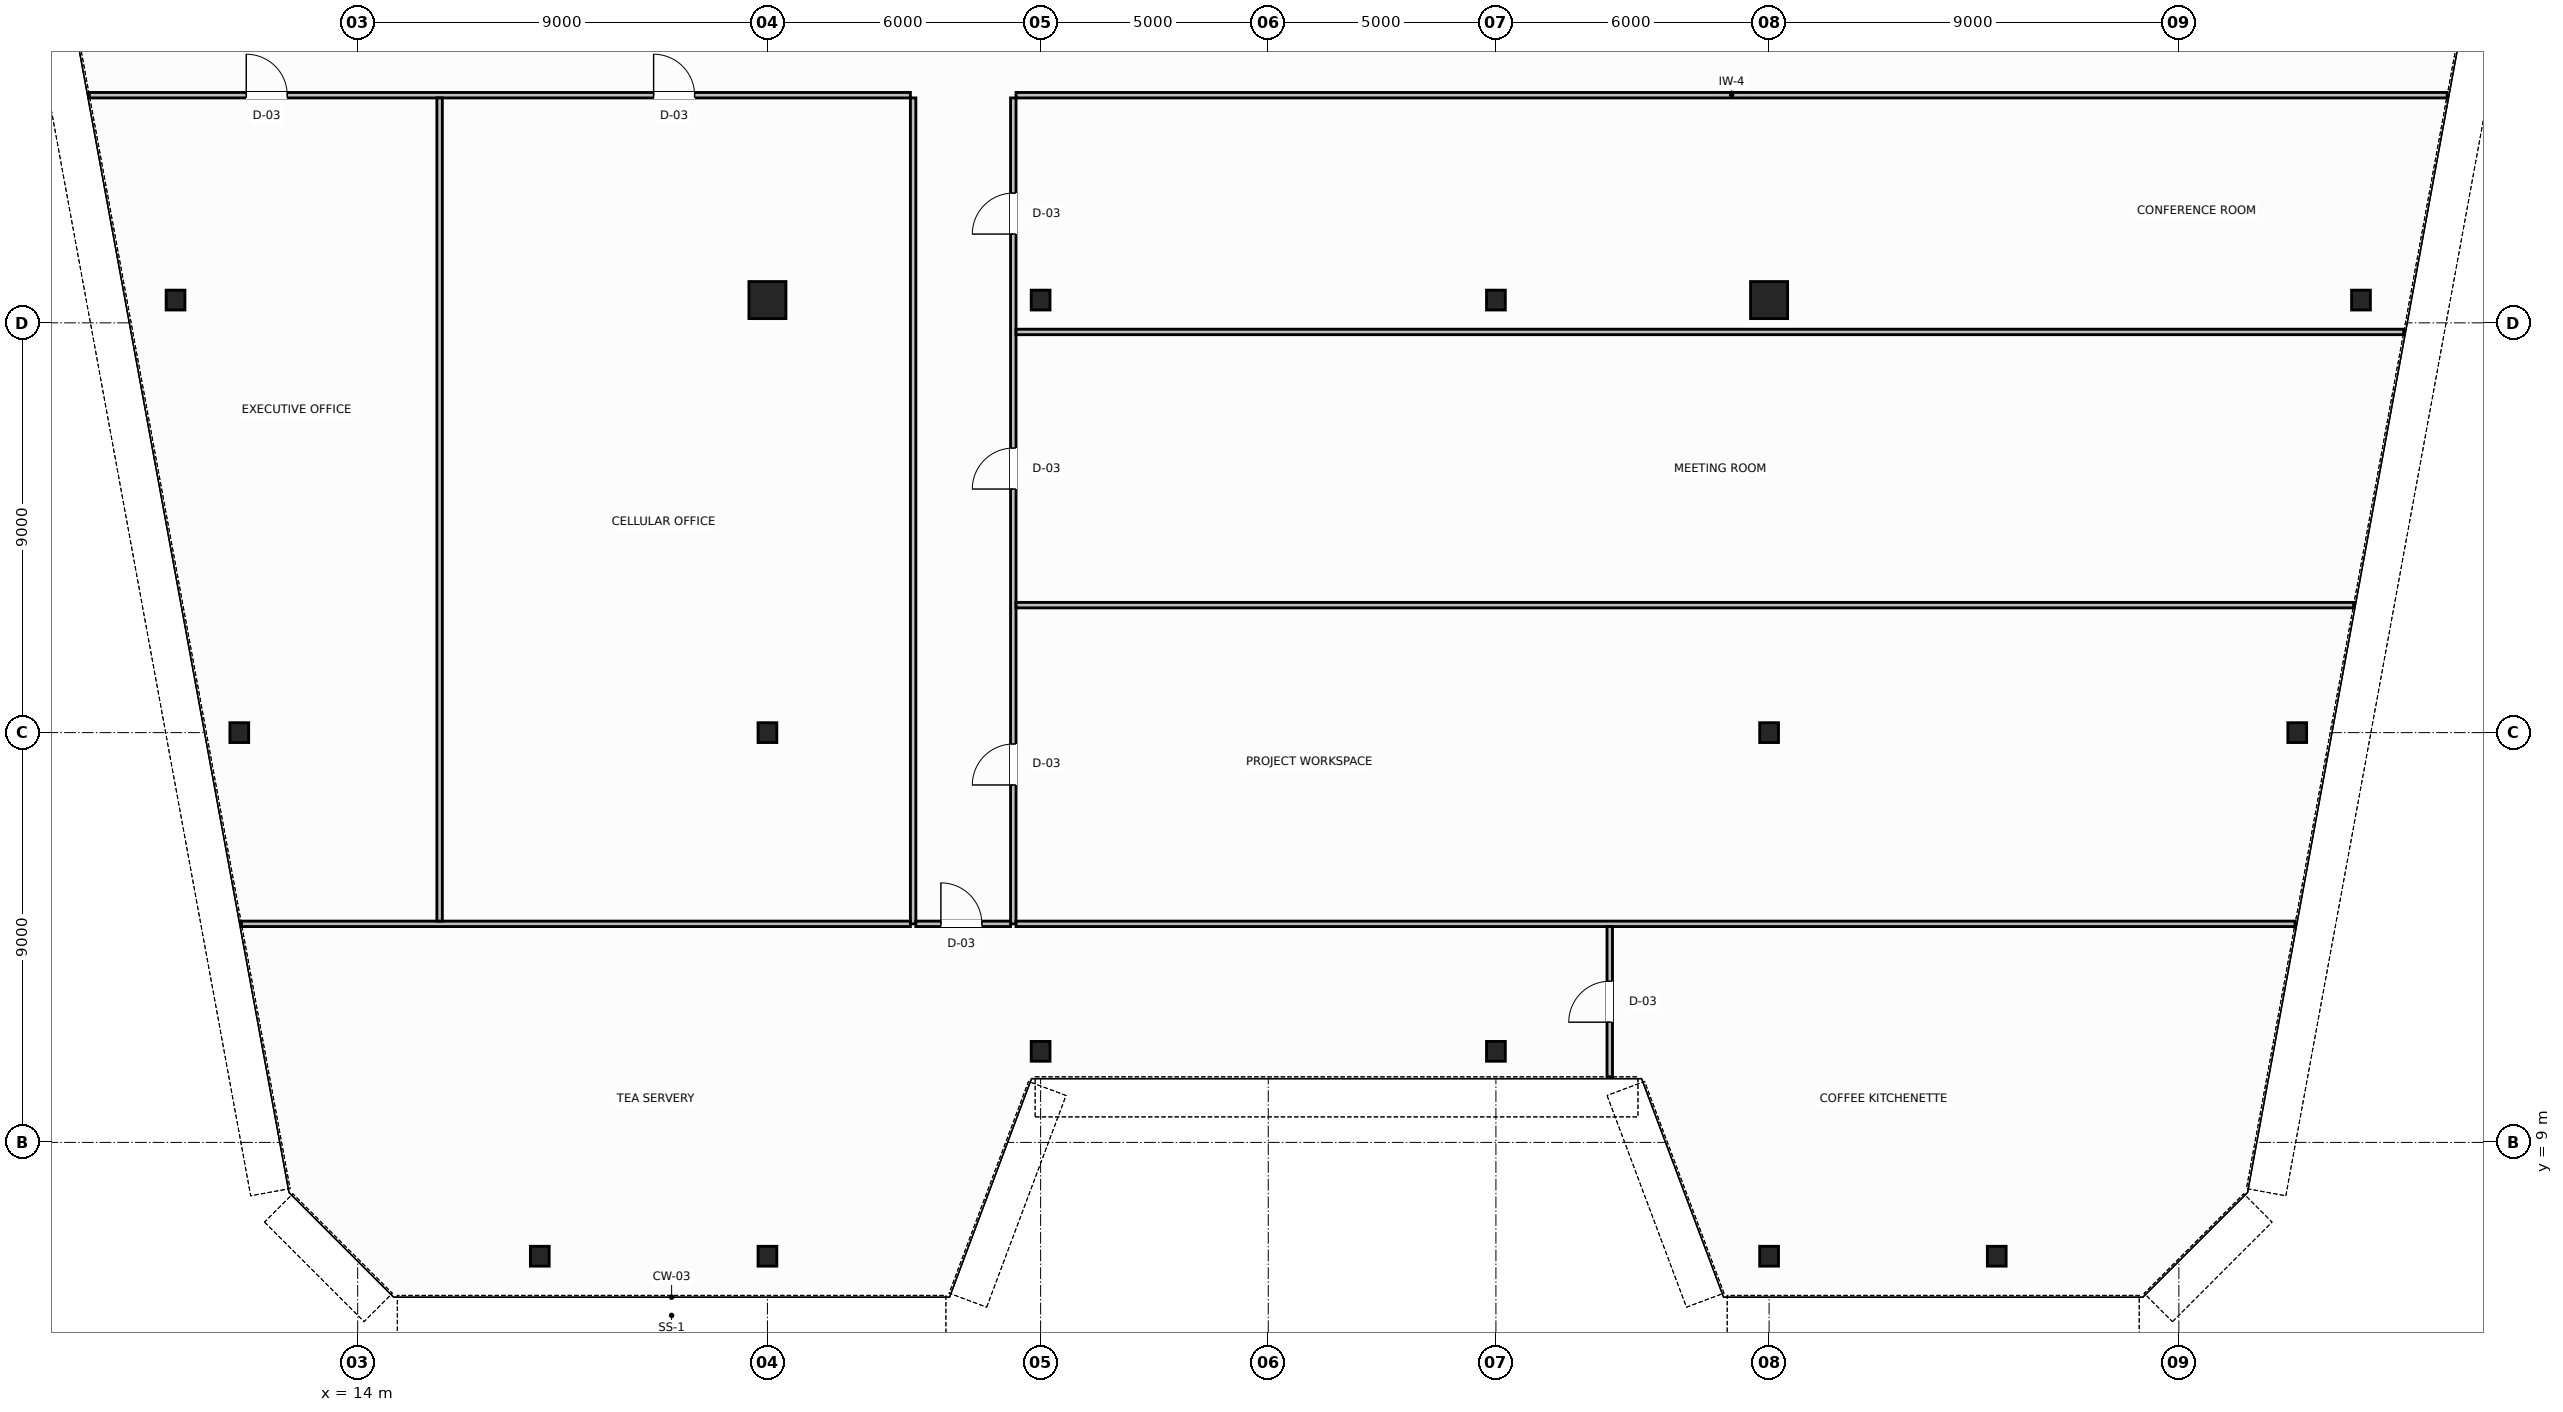
"""IFC4 building model, lengths in metres.
Left out: names, types, materials, properties, quantities, classifications, styles, units other than length and angle.
Written with IfcOpenShell. Run it as: python <this file> out.ifc"""

import sys

from ifc_helpers import new_model, si_unit, direction, frame, frame_2d, origin, origin_2d, place, context, subcontext, project, spatial, rectangle, hollow_circle, i_section, extrude, source, transform, mapped, element, fill, save


model = new_model("IFC4")
c1 = context("Model", 3, precision=1e-05, world=origin(), true_north=direction((0.0, 1.0)))
c2 = subcontext(c1, "Body", "Model", "MODEL_VIEW")
j1 = project(units=[si_unit("LENGTHUNIT", "METRE"), si_unit("PLANEANGLEUNIT", "RADIAN")], contexts=[c1])
p1 = place(None, origin())
s1 = spatial("IfcSite", under=j1, at=p1, CompositionType="ELEMENT")
p2 = place(p1, origin())
s2 = spatial("IfcBuilding", under=s1, at=p2, CompositionType="ELEMENT")
p3 = place(p2, frame((0.0, 0.0, 195.6)))
s3 = spatial("IfcBuildingStorey", under=s2, at=p3, CompositionType="ELEMENT", Elevation=195.6)
m1 = source(origin(), c2, "Body", "SweptSolid", [
    extrude(i_section(OverallWidth=0.412, OverallDepth=0.435, WebThickness=0.036, FlangeThickness=0.05, FilletRadius=0.015, at=origin_2d()), origin(), (0.0, 0.0, 1.0), 3.8),
])
for number, where, z_axis, x_axis in (
    (1, (10.0, 27.5, 0.0), (0.0, 0.0, 1.0), (1.0, 0.0, 0.0)),
    (2, (11.4, 18.0, 0.0), (0.0, 0.0, 1.0), (1.0, 0.0, 0.0)),
    (3, (58.0, 27.5, 0.0), (0.0, 0.0, 1.0), (1.0, 0.0, 0.0)),
    (4, (56.6, 18.0, 0.0), (0.0, 0.0, 1.0), (1.0, 0.0, 0.0)),
):
    element("IfcColumn", number, at=place(p3, frame(where, z_axis=z_axis, x_axis=x_axis)), inside=s3, PredefinedType="COLUMN", context=c2, shape_type="MappedRepresentation", body=[
        mapped(m1, transform((0.0, 0.0, 0.0), scale=1.0)),
    ])
m2 = source(origin(), c2, "Body", "SweptSolid", [
    extrude(hollow_circle(Radius=0.406, WallThickness=0.04, at=origin_2d()), origin(), (0.0, 0.0, 1.0), 3.8),
])
p4 = place(p3, frame((23.0, 27.5, 0.0), z_axis=(0.0, 0.0, 1.0), x_axis=(1.0, 0.0, 0.0)))
e5 = element("IfcColumn", 5, at=p4, inside=s3, PredefinedType="COLUMN", context=c2, shape_type="MappedRepresentation", body=[
    mapped(m2, transform((0.0, 0.0, 0.0), scale=1.0)),
])
m3 = source(origin(), c2, "Body", "SweptSolid", [
    extrude(i_section(OverallWidth=0.412, OverallDepth=0.435, WebThickness=0.036, FlangeThickness=0.05, FilletRadius=0.015, at=origin_2d()), origin(), (0.0, 0.0, 1.0), 3.8),
])
for number, where, z_axis, x_axis in (
    (6, (29.0, 27.5, 0.0), (0.0, 0.0, 1.0), (1.0, 0.0, 0.0)),
    (7, (39.0, 27.5, 0.0), (0.0, 0.0, 1.0), (1.0, 0.0, 0.0)),
):
    element("IfcColumn", number, at=place(p3, frame(where, z_axis=z_axis, x_axis=x_axis)), inside=s3, PredefinedType="COLUMN", context=c2, shape_type="MappedRepresentation", body=[
        mapped(m3, transform((0.0, 0.0, 0.0), scale=1.0)),
    ])
p5 = place(p3, frame((45.0, 27.5, 0.0), z_axis=(0.0, 0.0, 1.0), x_axis=(1.0, 0.0, 0.0)))
e8 = element("IfcColumn", 8, at=p5, inside=s3, PredefinedType="COLUMN", context=c2, shape_type="MappedRepresentation", body=[
    mapped(m2, transform((0.0, 0.0, 0.0), scale=1.0)),
])
for number, where, z_axis, x_axis in (
    (9, (23.0, 18.0, 0.0), (0.0, 0.0, 1.0), (1.0, 0.0, 0.0)),
    (10, (45.0, 18.0, 0.0), (0.0, 0.0, 1.0), (1.0, 0.0, 0.0)),
    (11, (18.0, 6.5, 0.0), (0.0, 0.0, 1.0), (1.0, 0.0, 0.0)),
    (12, (23.0, 6.5, 0.0), (0.0, 0.0, 1.0), (1.0, 0.0, 0.0)),
    (13, (29.0, 11.0, 0.0), (0.0, 0.0, 1.0), (1.0, 0.0, 0.0)),
    (14, (39.0, 11.0, 0.0), (0.0, 0.0, 1.0), (1.0, 0.0, 0.0)),
    (15, (45.0, 6.5, 0.0), (0.0, 0.0, 1.0), (1.0, 0.0, 0.0)),
    (16, (50.0, 6.5, 0.0), (0.0, 0.0, 1.0), (1.0, 0.0, 0.0)),
):
    element("IfcColumn", number, at=place(p3, frame(where, z_axis=z_axis, x_axis=x_axis)), inside=s3, PredefinedType="COLUMN", context=c2, shape_type="MappedRepresentation", body=[
        mapped(m3, transform((0.0, 0.0, 0.0), scale=1.0)),
    ])
p6 = place(p3, frame((8.106, 32.0, 0.0), z_axis=(0.0, 0.0, 1.0), x_axis=(1.0, 0.0, 0.0)))
e17 = element("IfcWall", 17, at=p6, inside=s3, PredefinedType="PARTITIONING", context=c2, shape_type="SweptSolid", body=[
    extrude(rectangle(XDim=18.034, YDim=0.12, at=frame_2d((9.017, 0.0))), origin(), (0.0, 0.0, 1.0), 3.58),
])
p7 = place(p6, frame((3.447, 0.0, 0.0)))
e18 = element("IfcOpeningElement", 18, at=p7, cuts=e17, PredefinedType="OPENING", context=c2, shape_type="SweptSolid", body=[
    extrude(rectangle(XDim=0.9, YDim=2.15, at=frame_2d((0.45, 1.075))), frame((0.0, 0.07, 0.0), z_axis=(0.0, -1.0, 0.0), x_axis=(1.0, 0.0, 0.0)), (0.0, 0.0, 1.0), 0.14),
])
p8 = place(p6, frame((12.394, 0.0, 0.0)))
e19 = element("IfcOpeningElement", 19, at=p8, cuts=e17, PredefinedType="OPENING", context=c2, shape_type="SweptSolid", body=[
    extrude(rectangle(XDim=0.9, YDim=2.15, at=frame_2d((0.45, 1.075))), frame((0.0, 0.07, 0.0), z_axis=(0.0, -1.0, 0.0), x_axis=(1.0, 0.0, 0.0)), (0.0, 0.0, 1.0), 0.14),
])
p9 = place(p3, frame((28.46, 32.0, 0.0), z_axis=(0.0, 0.0, 1.0), x_axis=(1.0, 0.0, 0.0)))
e20 = element("IfcWall", 20, at=p9, inside=s3, PredefinedType="PARTITIONING", context=c2, shape_type="SweptSolid", body=[
    extrude(rectangle(XDim=31.434, YDim=0.12, at=frame_2d((15.717, 0.0))), origin(), (0.0, 0.0, 1.0), 3.58),
])
p10 = place(p3, frame((26.2, 13.8, 0.0), z_axis=(0.0, 0.0, 1.0), x_axis=(0.0, 1.0, 0.0)))
e21 = element("IfcWall", 21, at=p10, inside=s3, PredefinedType="PARTITIONING", context=c2, shape_type="SweptSolid", body=[
    extrude(rectangle(XDim=18.14, YDim=0.12, at=frame_2d((9.07, 0.0))), origin(), (0.0, 0.0, 1.0), 3.58),
])
p11 = place(p3, frame((28.4, 13.8, 0.0), z_axis=(0.0, 0.0, 1.0), x_axis=(0.0, 1.0, 0.0)))
e22 = element("IfcWall", 22, at=p11, inside=s3, PredefinedType="PARTITIONING", context=c2, shape_type="SweptSolid", body=[
    extrude(rectangle(XDim=18.14, YDim=0.12, at=frame_2d((9.07, 0.0))), origin(), (0.0, 0.0, 1.0), 3.58),
])
p12 = place(p11, frame((3.05, 0.0, 0.0)))
e23 = element("IfcOpeningElement", 23, at=p12, cuts=e22, PredefinedType="OPENING", context=c2, shape_type="SweptSolid", body=[
    extrude(rectangle(XDim=0.9, YDim=2.15, at=frame_2d((0.45, 1.075))), frame((0.0, 0.07, 0.0), z_axis=(0.0, -1.0, 0.0), x_axis=(1.0, 0.0, 0.0)), (0.0, 0.0, 1.0), 0.14),
])
p13 = place(p11, frame((9.55, 0.0, 0.0)))
e24 = element("IfcOpeningElement", 24, at=p13, cuts=e22, PredefinedType="OPENING", context=c2, shape_type="SweptSolid", body=[
    extrude(rectangle(XDim=0.9, YDim=2.15, at=frame_2d((0.45, 1.075))), frame((0.0, 0.07, 0.0), z_axis=(0.0, -1.0, 0.0), x_axis=(1.0, 0.0, 0.0)), (0.0, 0.0, 1.0), 0.14),
])
p14 = place(p11, frame((15.15, 0.0, 0.0)))
e25 = element("IfcOpeningElement", 25, at=p14, cuts=e22, PredefinedType="OPENING", context=c2, shape_type="SweptSolid", body=[
    extrude(rectangle(XDim=0.9, YDim=2.15, at=frame_2d((0.45, 1.075))), frame((0.0, 0.07, 0.0), z_axis=(0.0, -1.0, 0.0), x_axis=(1.0, 0.0, 0.0)), (0.0, 0.0, 1.0), 0.14),
])
p15 = place(p3, frame((26.26, 13.8, 0.0), z_axis=(0.0, 0.0, 1.0), x_axis=(1.0, 0.0, 0.0)))
e26 = element("IfcWall", 26, at=p15, inside=s3, PredefinedType="PARTITIONING", context=c2, shape_type="SweptSolid", body=[
    extrude(rectangle(XDim=2.08, YDim=0.12, at=frame_2d((1.04, 0.0))), origin(), (0.0, 0.0, 1.0), 3.58),
])
p16 = place(p15, frame((0.55, 0.0, 0.0)))
e27 = element("IfcOpeningElement", 27, at=p16, cuts=e26, PredefinedType="OPENING", context=c2, shape_type="SweptSolid", body=[
    extrude(rectangle(XDim=0.9, YDim=2.15, at=frame_2d((0.45, 1.075))), frame((0.0, 0.07, 0.0), z_axis=(0.0, -1.0, 0.0), x_axis=(1.0, 0.0, 0.0)), (0.0, 0.0, 1.0), 0.14),
])
p17 = place(p3, frame((11.448, 13.8, 0.0), z_axis=(0.0, 0.0, 1.0), x_axis=(1.0, 0.0, 0.0)))
e28 = element("IfcWall", 28, at=p17, inside=s3, PredefinedType="PARTITIONING", context=c2, shape_type="SweptSolid", body=[
    extrude(rectangle(XDim=14.692, YDim=0.12, at=frame_2d((7.346, 0.0))), origin(), (0.0, 0.0, 1.0), 3.58),
])
p18 = place(p3, frame((28.46, 13.8, 0.0), z_axis=(0.0, 0.0, 1.0), x_axis=(1.0, 0.0, 0.0)))
e29 = element("IfcWall", 29, at=p18, inside=s3, PredefinedType="PARTITIONING", context=c2, shape_type="SweptSolid", body=[
    extrude(rectangle(XDim=28.092, YDim=0.12, at=frame_2d((14.046, 0.0))), origin(), (0.0, 0.0, 1.0), 3.58),
])
p19 = place(p3, frame((41.5, 10.44, 0.0), z_axis=(0.0, 0.0, 1.0), x_axis=(0.0, 1.0, 0.0)))
e30 = element("IfcWall", 30, at=p19, inside=s3, PredefinedType="PARTITIONING", context=c2, shape_type="SweptSolid", body=[
    extrude(rectangle(XDim=3.3, YDim=0.12, at=frame_2d((1.65, 0.0))), origin(), (0.0, 0.0, 1.0), 3.58),
])
p20 = place(p19, frame((1.2, 0.0, 0.0)))
e31 = element("IfcOpeningElement", 31, at=p20, cuts=e30, PredefinedType="OPENING", context=c2, shape_type="SweptSolid", body=[
    extrude(rectangle(XDim=0.9, YDim=2.15, at=frame_2d((0.45, 1.075))), frame((0.0, 0.07, 0.0), z_axis=(0.0, -1.0, 0.0), x_axis=(1.0, 0.0, 0.0)), (0.0, 0.0, 1.0), 0.14),
])
p21 = place(p3, frame((15.8, 13.86, 0.0), z_axis=(0.0, 0.0, 1.0), x_axis=(0.0, 1.0, 0.0)))
e32 = element("IfcWall", 32, at=p21, inside=s3, PredefinedType="PARTITIONING", context=c2, shape_type="SweptSolid", body=[
    extrude(rectangle(XDim=18.08, YDim=0.12, at=frame_2d((9.04, 0.0))), origin(), (0.0, 0.0, 1.0), 3.58),
])
p22 = place(p3, frame((28.46, 20.8, 0.0), z_axis=(0.0, 0.0, 1.0), x_axis=(1.0, 0.0, 0.0)))
e33 = element("IfcWall", 33, at=p22, inside=s3, PredefinedType="PARTITIONING", context=c2, shape_type="SweptSolid", body=[
    extrude(rectangle(XDim=29.377, YDim=0.12, at=frame_2d((14.689, 0.0))), origin(), (0.0, 0.0, 1.0), 3.58),
])
p23 = place(p3, frame((28.46, 26.8, 0.0), z_axis=(0.0, 0.0, 1.0), x_axis=(1.0, 0.0, 0.0)))
e34 = element("IfcWall", 34, at=p23, inside=s3, PredefinedType="PARTITIONING", context=c2, shape_type="SweptSolid", body=[
    extrude(rectangle(XDim=30.479, YDim=0.12, at=frame_2d((15.24, 0.0))), origin(), (0.0, 0.0, 1.0), 3.58),
])
m4 = source(origin(), c2, "Body", "SweptSolid", [
    extrude(rectangle(XDim=0.9, YDim=2.15, at=frame_2d((0.45, 1.075))), frame((0.0, 0.025, 0.0), z_axis=(0.0, -1.0, 0.0), x_axis=(1.0, 0.0, 0.0)), (0.0, 0.0, 1.0), 0.05),
])
p24 = place(p16, origin())
e35 = element("IfcDoor", 35, at=p24, inside=s3, OperationType="SINGLE_SWING_LEFT", PredefinedType="DOOR", context=c2, shape_type="MappedRepresentation", body=[
    mapped(m4, transform((0.0, 0.0, 0.0), scale=1.0)),
])
fill(e27, e35)
p25 = place(p20, origin())
e36 = element("IfcDoor", 36, at=p25, inside=s3, OperationType="SINGLE_SWING_RIGHT", PredefinedType="DOOR", context=c2, shape_type="MappedRepresentation", body=[
    mapped(m4, transform((0.0, 0.0, 0.0), scale=1.0)),
])
fill(e31, e36)
p26 = place(p7, origin())
e37 = element("IfcDoor", 37, at=p26, inside=s3, OperationType="SINGLE_SWING_LEFT", PredefinedType="DOOR", context=c2, shape_type="MappedRepresentation", body=[
    mapped(m4, transform((0.0, 0.0, 0.0), scale=1.0)),
])
fill(e18, e37)
p27 = place(p8, origin())
e38 = element("IfcDoor", 38, at=p27, inside=s3, OperationType="SINGLE_SWING_RIGHT", PredefinedType="DOOR", context=c2, shape_type="MappedRepresentation", body=[
    mapped(m4, transform((0.0, 0.0, 0.0), scale=1.0)),
])
fill(e19, e38)
p28 = place(p12, origin())
e39 = element("IfcDoor", 39, at=p28, inside=s3, OperationType="SINGLE_SWING_RIGHT", PredefinedType="DOOR", context=c2, shape_type="MappedRepresentation", body=[
    mapped(m4, transform((0.0, 0.0, 0.0), scale=1.0)),
])
fill(e23, e39)
p29 = place(p13, origin())
e40 = element("IfcDoor", 40, at=p29, inside=s3, OperationType="SINGLE_SWING_LEFT", PredefinedType="DOOR", context=c2, shape_type="MappedRepresentation", body=[
    mapped(m4, transform((0.0, 0.0, 0.0), scale=1.0)),
])
fill(e24, e40)
p30 = place(p14, origin())
e41 = element("IfcDoor", 41, at=p30, inside=s3, OperationType="SINGLE_SWING_RIGHT", PredefinedType="DOOR", context=c2, shape_type="MappedRepresentation", body=[
    mapped(m4, transform((0.0, 0.0, 0.0), scale=1.0)),
])
fill(e25, e41)
save(model, sys.argv[1])
